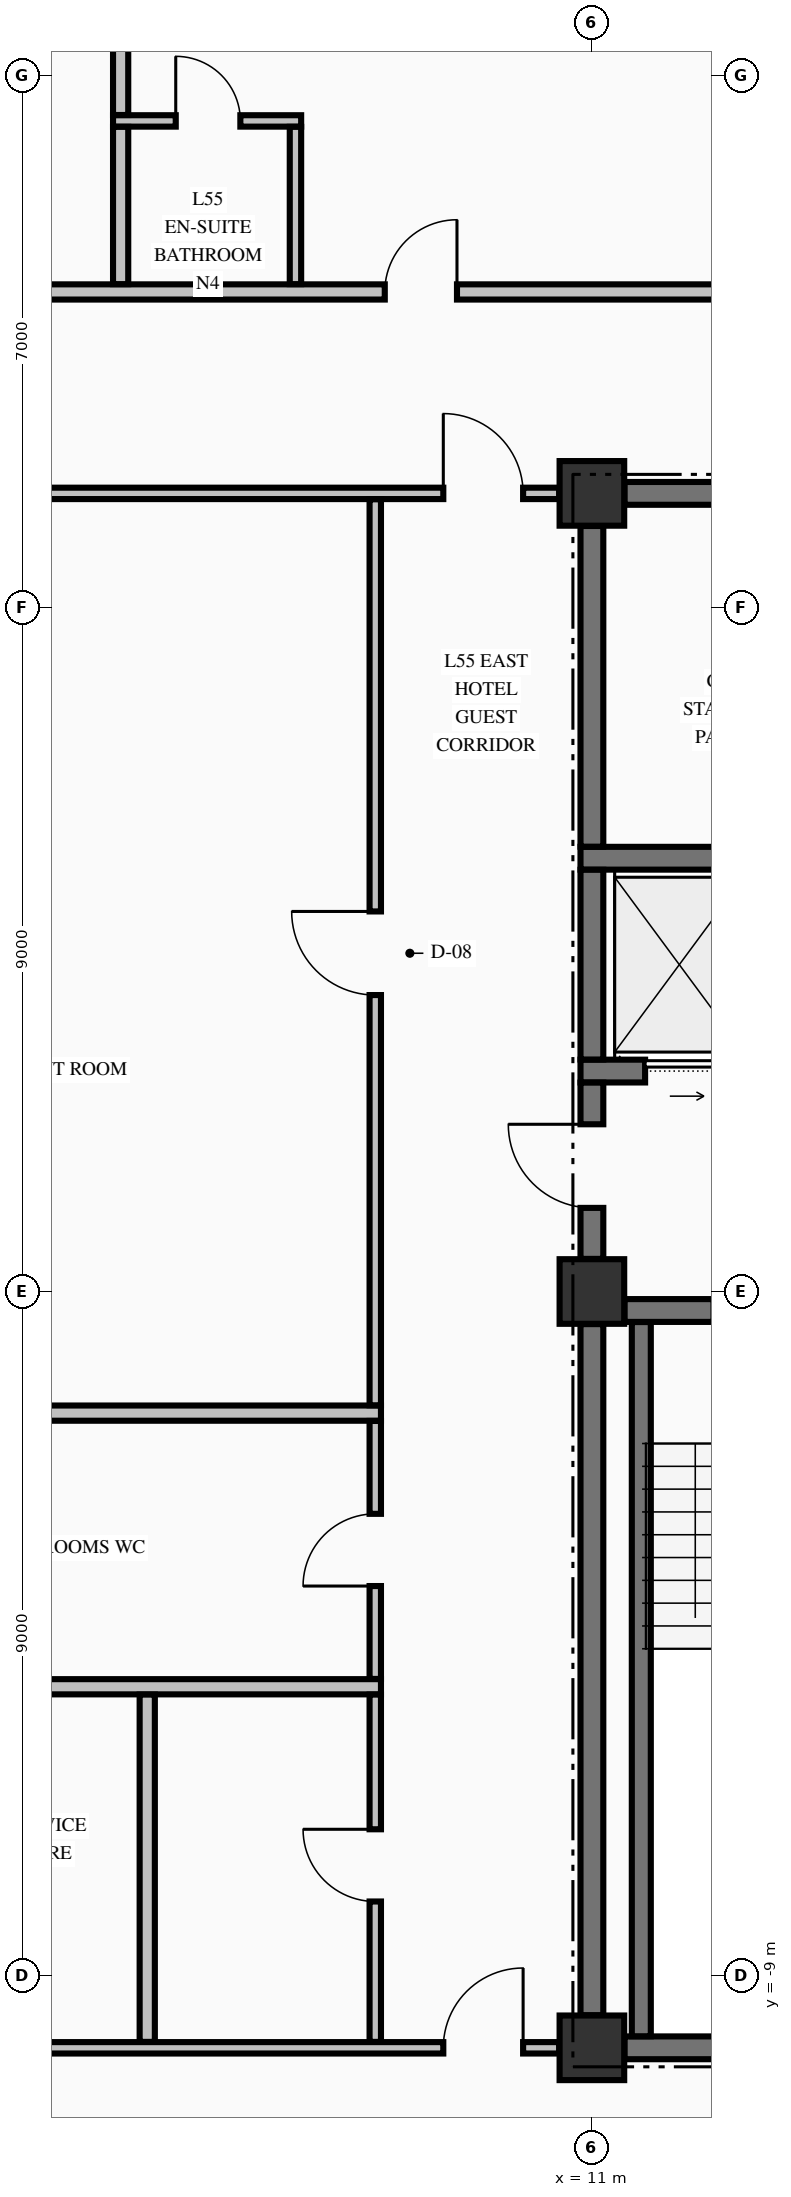
"""IFC4 building model, lengths in metres.
Left out: names, types, materials, properties, quantities, classifications, styles, units other than length and angle.
Written with IfcOpenShell. Run it as: python <this file> out.ifc"""

import sys

from ifc_helpers import new_model, si_unit, direction, frame, frame_2d, origin, origin_2d, place, context, subcontext, project, spatial, rectangle, extrude, element, fill, save


model = new_model("IFC4")
c1 = context("Model", 3, precision=1e-05, world=origin(), true_north=direction((0.0, 1.0)))
c2 = subcontext(c1, "Body", "Model", "MODEL_VIEW")
j1 = project(units=[si_unit("LENGTHUNIT", "METRE"), si_unit("PLANEANGLEUNIT", "RADIAN")], contexts=[c1])
p1 = place(None, origin())
s1 = spatial("IfcSite", under=j1, at=p1, CompositionType="ELEMENT")
p2 = place(p1, origin())
s2 = spatial("IfcBuilding", under=s1, at=p2, CompositionType="ELEMENT")
p3 = place(p2, frame((0.0, 0.0, 211.86)))
s3 = spatial("IfcBuildingStorey", under=s2, at=p3, CompositionType="ELEMENT", Elevation=211.86)
for number, where, z_axis, x_axis in (
    (1, (11.0, -9.95, -0.325), (0.0, 0.0, 1.0), (1.0, 0.0, 0.0)),
    (2, (11.0, 0.0, -0.325), (0.0, 0.0, 1.0), (1.0, 0.0, 0.0)),
    (3, (11.0, 10.5, -0.325), (0.0, 0.0, 1.0), (1.0, 0.0, 0.0)),
):
    element("IfcColumn", number, at=place(p3, frame(where, z_axis=z_axis, x_axis=x_axis)), inside=s3, PredefinedType="COLUMN", context=c2, shape_type="SweptSolid", body=[
        extrude(rectangle(XDim=0.85, YDim=0.85, at=origin_2d()), origin(), (0.0, 0.0, 1.0), 3.475),
    ])
p4 = place(p3, frame((11.429, -9.95, 0.0), z_axis=(0.0, 0.0, 1.0), x_axis=(1.0, 0.0, 0.0)))
e4 = element("IfcWall", 4, at=p4, inside=s3, PredefinedType="SHEAR", context=c2, shape_type="SweptSolid", body=[
    extrude(rectangle(XDim=3.271, YDim=0.3, at=frame_2d((1.635, 0.0))), origin(), (0.0, 0.0, 1.0), 3.15),
])
p5 = place(p3, frame((11.429, -0.25, 0.0), z_axis=(0.0, 0.0, 1.0), x_axis=(1.0, 0.0, 0.0)))
e5 = element("IfcWall", 5, at=p5, inside=s3, PredefinedType="SHEAR", context=c2, shape_type="SweptSolid", body=[
    extrude(rectangle(XDim=3.446, YDim=0.3, at=frame_2d((1.723, 0.0))), origin(), (0.0, 0.0, 1.0), 3.15),
])
p6 = place(p5, frame((1.171, 0.0, 0.0)))
e6 = element("IfcOpeningElement", 6, at=p6, cuts=e5, PredefinedType="OPENING", context=c2, shape_type="SweptSolid", body=[
    extrude(rectangle(XDim=1.1, YDim=2.15, at=frame_2d((0.55, 1.075))), frame((0.0, 0.16, 0.0), z_axis=(0.0, -1.0, 0.0), x_axis=(1.0, 0.0, 0.0)), (0.0, 0.0, 1.0), 0.32),
])
p7 = place(p3, frame((10.85, 2.9, 0.0), z_axis=(0.0, 0.0, 1.0), x_axis=(1.0, 0.0, 0.0)))
e7 = element("IfcWall", 7, at=p7, inside=s3, PredefinedType="SHEAR", context=c2, shape_type="SweptSolid", body=[
    extrude(rectangle(XDim=4.025, YDim=0.3, at=frame_2d((2.012, 0.0))), origin(), (0.0, 0.0, 1.0), 3.15),
])
p8 = place(p7, frame((0.85, 0.0, 0.0)))
e8 = element("IfcOpeningElement", 8, at=p8, cuts=e7, PredefinedType="OPENING", context=c2, shape_type="SweptSolid", body=[
    extrude(rectangle(XDim=1.1, YDim=2.2, at=frame_2d((0.55, 1.1))), frame((0.0, 0.16, 0.0), z_axis=(0.0, -1.0, 0.0), x_axis=(1.0, 0.0, 0.0)), (0.0, 0.0, 1.0), 0.32),
])
p9 = place(p3, frame((10.85, 5.7, 0.0), z_axis=(0.0, 0.0, 1.0), x_axis=(1.0, 0.0, 0.0)))
e9 = element("IfcWall", 9, at=p9, inside=s3, PredefinedType="SHEAR", context=c2, shape_type="SweptSolid", body=[
    extrude(rectangle(XDim=4.025, YDim=0.3, at=frame_2d((2.012, 0.0))), origin(), (0.0, 0.0, 1.0), 3.15),
])
p10 = place(p3, frame((11.429, 10.5, 0.0), z_axis=(0.0, 0.0, 1.0), x_axis=(1.0, 0.0, 0.0)))
e10 = element("IfcWall", 10, at=p10, inside=s3, PredefinedType="SHEAR", context=c2, shape_type="SweptSolid", body=[
    extrude(rectangle(XDim=3.271, YDim=0.3, at=frame_2d((1.635, 0.0))), origin(), (0.0, 0.0, 1.0), 3.15),
])
p11 = place(p10, frame((1.546, 0.0, 0.0)))
e11 = element("IfcOpeningElement", 11, at=p11, cuts=e10, PredefinedType="OPENING", context=c2, shape_type="SweptSolid", body=[
    extrude(rectangle(XDim=0.95, YDim=2.15, at=frame_2d((0.475, 1.075))), frame((0.0, 0.16, 0.0), z_axis=(0.0, -1.0, 0.0), x_axis=(1.0, 0.0, 0.0)), (0.0, 0.0, 1.0), 0.32),
])
p12 = place(p3, frame((-10.569, -9.95, 0.0), z_axis=(0.0, 0.0, 1.0), x_axis=(1.0, 0.0, 0.0)))
e12 = element("IfcWall", 12, at=p12, inside=s3, PredefinedType="PARTITIONING", context=c2, shape_type="SweptSolid", body=[
    extrude(rectangle(XDim=21.138, YDim=0.15, at=frame_2d((10.569, 0.0))), origin(), (0.0, 0.0, 1.0), 3.15),
])
p13 = place(p12, frame((0.474, 0.0, 0.0)))
e13 = element("IfcOpeningElement", 13, at=p13, cuts=e12, PredefinedType="OPENING", context=c2, shape_type="SweptSolid", body=[
    extrude(rectangle(XDim=1.05, YDim=2.15, at=frame_2d((0.525, 1.075))), frame((0.0, 0.085, 0.0), z_axis=(0.0, -1.0, 0.0), x_axis=(1.0, 0.0, 0.0)), (0.0, 0.0, 1.0), 0.17),
])
p14 = place(p12, frame((19.614, 0.0, 0.0)))
e14 = element("IfcOpeningElement", 14, at=p14, cuts=e12, PredefinedType="OPENING", context=c2, shape_type="SweptSolid", body=[
    extrude(rectangle(XDim=1.05, YDim=2.15, at=frame_2d((0.525, 1.075))), frame((0.0, 0.085, 0.0), z_axis=(0.0, -1.0, 0.0), x_axis=(1.0, 0.0, 0.0)), (0.0, 0.0, 1.0), 0.17),
])
p15 = place(p12, frame((11.774, 0.0, 0.0)))
e15 = element("IfcOpeningElement", 15, at=p15, cuts=e12, PredefinedType="OPENING", context=c2, shape_type="SweptSolid", body=[
    extrude(rectangle(XDim=0.95, YDim=2.15, at=frame_2d((0.475, 1.075))), frame((0.0, 0.085, 0.0), z_axis=(0.0, -1.0, 0.0), x_axis=(1.0, 0.0, 0.0)), (0.0, 0.0, 1.0), 0.17),
])
for number, where, z_axis, x_axis in (
    (16, (-1.9, -5.2, 0.0), (0.0, 0.0, 1.0), (1.0, 0.0, 0.0)),
    (17, (-1.9, -1.6, 0.0), (0.0, 0.0, 1.0), (1.0, 0.0, 0.0)),
):
    element("IfcWall", number, at=place(p3, frame(where, z_axis=z_axis, x_axis=x_axis)), inside=s3, PredefinedType="PARTITIONING", context=c2, shape_type="SweptSolid", body=[
        extrude(rectangle(XDim=10.125, YDim=0.2, at=frame_2d((5.062, 0.0))), origin(), (0.0, 0.0, 1.0), 3.15),
    ])
p16 = place(p3, frame((-10.569, 10.5, 0.0), z_axis=(0.0, 0.0, 1.0), x_axis=(1.0, 0.0, 0.0)))
e18 = element("IfcWall", 18, at=p16, inside=s3, PredefinedType="PARTITIONING", context=c2, shape_type="SweptSolid", body=[
    extrude(rectangle(XDim=21.138, YDim=0.15, at=frame_2d((10.569, 0.0))), origin(), (0.0, 0.0, 1.0), 3.15),
])
p17 = place(p16, frame((0.474, 0.0, 0.0)))
e19 = element("IfcOpeningElement", 19, at=p17, cuts=e18, PredefinedType="OPENING", context=c2, shape_type="SweptSolid", body=[
    extrude(rectangle(XDim=1.05, YDim=2.15, at=frame_2d((0.525, 1.075))), frame((0.0, 0.085, 0.0), z_axis=(0.0, -1.0, 0.0), x_axis=(1.0, 0.0, 0.0)), (0.0, 0.0, 1.0), 0.17),
])
p18 = place(p16, frame((19.614, 0.0, 0.0)))
e20 = element("IfcOpeningElement", 20, at=p18, cuts=e18, PredefinedType="OPENING", context=c2, shape_type="SweptSolid", body=[
    extrude(rectangle(XDim=1.05, YDim=2.15, at=frame_2d((0.525, 1.075))), frame((0.0, 0.085, 0.0), z_axis=(0.0, -1.0, 0.0), x_axis=(1.0, 0.0, 0.0)), (0.0, 0.0, 1.0), 0.17),
])
p19 = place(p3, frame((-22.1, 13.15, 0.0), z_axis=(0.0, 0.0, 1.0), x_axis=(1.0, 0.0, 0.0)))
e21 = element("IfcWall", 21, at=p19, inside=s3, PredefinedType="PARTITIONING", context=c2, shape_type="SweptSolid", body=[
    extrude(rectangle(XDim=39.2, YDim=0.2, at=frame_2d((19.6, 0.0))), origin(), (0.0, 0.0, 1.0), 3.15),
])
p20 = place(p19, frame((5.125, 0.0, 0.0)))
e22 = element("IfcOpeningElement", 22, at=p20, cuts=e21, PredefinedType="OPENING", context=c2, shape_type="SweptSolid", body=[
    extrude(rectangle(XDim=1.05, YDim=2.15, at=frame_2d((0.525, 1.075))), frame((0.0, 0.11, 0.0), z_axis=(0.0, -1.0, 0.0), x_axis=(1.0, 0.0, 0.0)), (0.0, 0.0, 1.0), 0.22),
])
p21 = place(p19, frame((14.125, 0.0, 0.0)))
e23 = element("IfcOpeningElement", 23, at=p21, cuts=e21, PredefinedType="OPENING", context=c2, shape_type="SweptSolid", body=[
    extrude(rectangle(XDim=0.95, YDim=2.15, at=frame_2d((0.475, 1.075))), frame((0.0, 0.11, 0.0), z_axis=(0.0, -1.0, 0.0), x_axis=(1.0, 0.0, 0.0)), (0.0, 0.0, 1.0), 0.22),
])
p22 = place(p19, frame((21.375, 0.0, 0.0)))
e24 = element("IfcOpeningElement", 24, at=p22, cuts=e21, PredefinedType="OPENING", context=c2, shape_type="SweptSolid", body=[
    extrude(rectangle(XDim=0.95, YDim=2.15, at=frame_2d((0.475, 1.075))), frame((0.0, 0.11, 0.0), z_axis=(0.0, -1.0, 0.0), x_axis=(1.0, 0.0, 0.0)), (0.0, 0.0, 1.0), 0.22),
])
p23 = place(p19, frame((30.375, 0.0, 0.0)))
e25 = element("IfcOpeningElement", 25, at=p23, cuts=e21, PredefinedType="OPENING", context=c2, shape_type="SweptSolid", body=[
    extrude(rectangle(XDim=0.95, YDim=2.15, at=frame_2d((0.475, 1.075))), frame((0.0, 0.11, 0.0), z_axis=(0.0, -1.0, 0.0), x_axis=(1.0, 0.0, 0.0)), (0.0, 0.0, 1.0), 0.22),
])
p24 = place(p3, frame((4.7, 15.4, 0.0), z_axis=(0.0, 0.0, 1.0), x_axis=(1.0, 0.0, 0.0)))
e26 = element("IfcWall", 26, at=p24, inside=s3, PredefinedType="PARTITIONING", context=c2, shape_type="SweptSolid", body=[
    extrude(rectangle(XDim=2.475, YDim=0.15, at=frame_2d((1.238, 0.0))), origin(), (0.0, 0.0, 1.0), 3.15),
])
p25 = place(p24, frame((0.825, 0.0, 0.0)))
e27 = element("IfcOpeningElement", 27, at=p25, cuts=e26, PredefinedType="OPENING", context=c2, shape_type="SweptSolid", body=[
    extrude(rectangle(XDim=0.85, YDim=2.1, at=frame_2d((0.425, 1.05))), frame((0.0, 0.085, 0.0), z_axis=(0.0, -1.0, 0.0), x_axis=(1.0, 0.0, 0.0)), (0.0, 0.0, 1.0), 0.17),
])
p26 = place(p3, frame((11.0, -9.521, 0.0), z_axis=(0.0, 0.0, 1.0), x_axis=(0.0, 1.0, 0.0)))
e28 = element("IfcWall", 28, at=p26, inside=s3, PredefinedType="SHEAR", context=c2, shape_type="SweptSolid", body=[
    extrude(rectangle(XDim=9.092, YDim=0.3, at=frame_2d((4.546, 0.0))), origin(), (0.0, 0.0, 1.0), 3.15),
])
p27 = place(p3, frame((11.0, 0.429, 0.0), z_axis=(0.0, 0.0, 1.0), x_axis=(0.0, 1.0, 0.0)))
e29 = element("IfcWall", 29, at=p27, inside=s3, PredefinedType="SHEAR", context=c2, shape_type="SweptSolid", body=[
    extrude(rectangle(XDim=2.319, YDim=0.3, at=frame_2d((1.16, 0.0))), origin(), (0.0, 0.0, 1.0), 3.15),
])
p28 = place(p27, frame((0.671, 0.0, 0.0)))
e30 = element("IfcOpeningElement", 30, at=p28, cuts=e29, PredefinedType="OPENING", context=c2, shape_type="SweptSolid", body=[
    extrude(rectangle(XDim=1.1, YDim=2.15, at=frame_2d((0.55, 1.075))), frame((0.0, 0.16, 0.0), z_axis=(0.0, -1.0, 0.0), x_axis=(1.0, 0.0, 0.0)), (0.0, 0.0, 1.0), 0.32),
])
p29 = place(p3, frame((11.0, 3.052, 0.0), z_axis=(0.0, 0.0, 1.0), x_axis=(0.0, 1.0, 0.0)))
e31 = element("IfcWall", 31, at=p29, inside=s3, PredefinedType="SHEAR", context=c2, shape_type="SweptSolid", body=[
    extrude(rectangle(XDim=2.496, YDim=0.3, at=frame_2d((1.248, 0.0))), origin(), (0.0, 0.0, 1.0), 3.15),
])
p30 = place(p3, frame((11.0, 5.852, 0.0), z_axis=(0.0, 0.0, 1.0), x_axis=(0.0, 1.0, 0.0)))
e32 = element("IfcWall", 32, at=p30, inside=s3, PredefinedType="SHEAR", context=c2, shape_type="SweptSolid", body=[
    extrude(rectangle(XDim=4.219, YDim=0.3, at=frame_2d((2.109, 0.0))), origin(), (0.0, 0.0, 1.0), 3.15),
])
p31 = place(p3, frame((11.65, -9.798, 0.0), z_axis=(0.0, 0.0, 1.0), x_axis=(0.0, 1.0, 0.0)))
e33 = element("IfcWall", 33, at=p31, inside=s3, PredefinedType="SOLIDWALL", context=c2, shape_type="SweptSolid", body=[
    extrude(rectangle(XDim=9.396, YDim=0.25, at=frame_2d((4.698, 0.0))), origin(), (0.0, 0.0, 1.0), 3.15),
])
p32 = place(p3, frame((4.8, 13.253, 0.0), z_axis=(0.0, 0.0, 1.0), x_axis=(0.0, 1.0, 0.0)))
e34 = element("IfcWall", 34, at=p32, inside=s3, PredefinedType="PARTITIONING", context=c2, shape_type="SweptSolid", body=[
    extrude(rectangle(XDim=2.069, YDim=0.2, at=frame_2d((1.035, 0.0))), origin(), (0.0, 0.0, 1.0), 3.15),
])
p33 = place(p3, frame((4.8, 15.478, 0.0), z_axis=(0.0, 0.0, 1.0), x_axis=(0.0, 1.0, 0.0)))
e35 = element("IfcWall", 35, at=p33, inside=s3, PredefinedType="PARTITIONING", context=c2, shape_type="SweptSolid", body=[
    extrude(rectangle(XDim=8.857, YDim=0.2, at=frame_2d((4.428, 0.0))), origin(), (0.0, 0.0, 1.0), 3.15),
])
p34 = place(p3, frame((5.15, -9.872, 0.0), z_axis=(0.0, 0.0, 1.0), x_axis=(0.0, 1.0, 0.0)))
e36 = element("IfcWall", 36, at=p34, inside=s3, PredefinedType="PARTITIONING", context=c2, shape_type="SweptSolid", body=[
    extrude(rectangle(XDim=4.569, YDim=0.2, at=frame_2d((2.285, 0.0))), origin(), (0.0, 0.0, 1.0), 3.15),
])
p35 = place(p3, frame((7.1, 13.253, 0.0), z_axis=(0.0, 0.0, 1.0), x_axis=(0.0, 1.0, 0.0)))
e37 = element("IfcWall", 37, at=p35, inside=s3, PredefinedType="PARTITIONING", context=c2, shape_type="SweptSolid", body=[
    extrude(rectangle(XDim=2.069, YDim=0.15, at=frame_2d((1.035, 0.0))), origin(), (0.0, 0.0, 1.0), 3.15),
])
p36 = place(p3, frame((8.15, -9.872, 0.0), z_axis=(0.0, 0.0, 1.0), x_axis=(0.0, 1.0, 0.0)))
e38 = element("IfcWall", 38, at=p36, inside=s3, PredefinedType="PARTITIONING", context=c2, shape_type="SweptSolid", body=[
    extrude(rectangle(XDim=4.569, YDim=0.15, at=frame_2d((2.285, 0.0))), origin(), (0.0, 0.0, 1.0), 3.15),
])
p37 = place(p36, frame((1.847, 0.0, 0.0)))
e39 = element("IfcOpeningElement", 39, at=p37, cuts=e38, PredefinedType="OPENING", context=c2, shape_type="SweptSolid", body=[
    extrude(rectangle(XDim=0.95, YDim=2.15, at=frame_2d((0.475, 1.075))), frame((0.0, 0.085, 0.0), z_axis=(0.0, -1.0, 0.0), x_axis=(1.0, 0.0, 0.0)), (0.0, 0.0, 1.0), 0.17),
])
p38 = place(p3, frame((8.15, -5.097, 0.0), z_axis=(0.0, 0.0, 1.0), x_axis=(0.0, 1.0, 0.0)))
e40 = element("IfcWall", 40, at=p38, inside=s3, PredefinedType="PARTITIONING", context=c2, shape_type="SweptSolid", body=[
    extrude(rectangle(XDim=3.394, YDim=0.15, at=frame_2d((1.697, 0.0))), origin(), (0.0, 0.0, 1.0), 3.15),
])
p39 = place(p38, frame((1.222, 0.0, 0.0)))
e41 = element("IfcOpeningElement", 41, at=p39, cuts=e40, PredefinedType="OPENING", context=c2, shape_type="SweptSolid", body=[
    extrude(rectangle(XDim=0.95, YDim=2.15, at=frame_2d((0.475, 1.075))), frame((0.0, 0.085, 0.0), z_axis=(0.0, -1.0, 0.0), x_axis=(1.0, 0.0, 0.0)), (0.0, 0.0, 1.0), 0.17),
])
p40 = place(p3, frame((8.15, -1.497, 0.0), z_axis=(0.0, 0.0, 1.0), x_axis=(0.0, 1.0, 0.0)))
e42 = element("IfcWall", 42, at=p40, inside=s3, PredefinedType="PARTITIONING", context=c2, shape_type="SweptSolid", body=[
    extrude(rectangle(XDim=11.919, YDim=0.15, at=frame_2d((5.959, 0.0))), origin(), (0.0, 0.0, 1.0), 3.15),
])
p41 = place(p40, frame((5.397, 0.0, 0.0)))
e43 = element("IfcOpeningElement", 43, at=p41, cuts=e42, PredefinedType="OPENING", context=c2, shape_type="SweptSolid", body=[
    extrude(rectangle(XDim=1.1, YDim=2.15, at=frame_2d((0.55, 1.075))), frame((0.0, 0.085, 0.0), z_axis=(0.0, -1.0, 0.0), x_axis=(1.0, 0.0, 0.0)), (0.0, 0.0, 1.0), 0.17),
])
p42 = place(p28, origin())
e44 = element("IfcDoor", 44, at=p42, inside=s3, OperationType="SINGLE_SWING_RIGHT", PredefinedType="DOOR", context=c2, shape_type="SweptSolid", body=[
    extrude(rectangle(XDim=1.1, YDim=2.15, at=frame_2d((0.55, 1.075))), frame((0.0, 0.025, 0.0), z_axis=(0.0, -1.0, 0.0), x_axis=(1.0, 0.0, 0.0)), (0.0, 0.0, 1.0), 0.05),
])
fill(e30, e44)
p43 = place(p8, origin())
e45 = element("IfcDoor", 45, at=p43, inside=s3, OperationType="SLIDING_TO_RIGHT", PredefinedType="DOOR", context=c2, shape_type="SweptSolid", body=[
    extrude(rectangle(XDim=1.1, YDim=2.2, at=frame_2d((0.55, 1.1))), frame((0.0, 0.025, 0.0), z_axis=(0.0, -1.0, 0.0), x_axis=(1.0, 0.0, 0.0)), (0.0, 0.0, 1.0), 0.05),
])
fill(e8, e45)
p44 = place(p18, origin())
e46 = element("IfcDoor", 46, at=p44, inside=s3, OperationType="SINGLE_SWING_LEFT", PredefinedType="DOOR", context=c2, shape_type="SweptSolid", body=[
    extrude(rectangle(XDim=1.05, YDim=2.15, at=frame_2d((0.525, 1.075))), frame((0.0, 0.025, 0.0), z_axis=(0.0, -1.0, 0.0), x_axis=(1.0, 0.0, 0.0)), (0.0, 0.0, 1.0), 0.05),
])
fill(e20, e46)
p45 = place(p14, origin())
e47 = element("IfcDoor", 47, at=p45, inside=s3, OperationType="SINGLE_SWING_RIGHT", PredefinedType="DOOR", context=c2, shape_type="SweptSolid", body=[
    extrude(rectangle(XDim=1.05, YDim=2.15, at=frame_2d((0.525, 1.075))), frame((0.0, 0.025, 0.0), z_axis=(0.0, -1.0, 0.0), x_axis=(1.0, 0.0, 0.0)), (0.0, 0.0, 1.0), 0.05),
])
fill(e14, e47)
p46 = place(p23, origin())
e48 = element("IfcDoor", 48, at=p46, inside=s3, OperationType="SINGLE_SWING_RIGHT", PredefinedType="DOOR", context=c2, shape_type="SweptSolid", body=[
    extrude(rectangle(XDim=0.95, YDim=2.15, at=frame_2d((0.475, 1.075))), frame((0.0, 0.025, 0.0), z_axis=(0.0, -1.0, 0.0), x_axis=(1.0, 0.0, 0.0)), (0.0, 0.0, 1.0), 0.05),
])
fill(e25, e48)
p47 = place(p25, origin())
e49 = element("IfcDoor", 49, at=p47, inside=s3, OperationType="SINGLE_SWING_LEFT", PredefinedType="DOOR", context=c2, shape_type="SweptSolid", body=[
    extrude(rectangle(XDim=0.85, YDim=2.1, at=frame_2d((0.425, 1.05))), frame((0.0, 0.025, 0.0), z_axis=(0.0, -1.0, 0.0), x_axis=(1.0, 0.0, 0.0)), (0.0, 0.0, 1.0), 0.05),
])
fill(e27, e49)
p48 = place(p41, origin())
e50 = element("IfcDoor", 50, at=p48, inside=s3, OperationType="SINGLE_SWING_RIGHT", PredefinedType="DOOR", context=c2, shape_type="SweptSolid", body=[
    extrude(rectangle(XDim=1.1, YDim=2.15, at=frame_2d((0.55, 1.075))), frame((0.0, 0.025, 0.0), z_axis=(0.0, -1.0, 0.0), x_axis=(1.0, 0.0, 0.0)), (0.0, 0.0, 1.0), 0.05),
])
fill(e43, e50)
p49 = place(p39, origin())
e51 = element("IfcDoor", 51, at=p49, inside=s3, OperationType="SINGLE_SWING_LEFT", PredefinedType="DOOR", context=c2, shape_type="SweptSolid", body=[
    extrude(rectangle(XDim=0.95, YDim=2.15, at=frame_2d((0.475, 1.075))), frame((0.0, 0.025, 0.0), z_axis=(0.0, -1.0, 0.0), x_axis=(1.0, 0.0, 0.0)), (0.0, 0.0, 1.0), 0.05),
])
fill(e41, e51)
p50 = place(p37, origin())
e52 = element("IfcDoor", 52, at=p50, inside=s3, OperationType="SINGLE_SWING_RIGHT", PredefinedType="DOOR", context=c2, shape_type="SweptSolid", body=[
    extrude(rectangle(XDim=0.95, YDim=2.15, at=frame_2d((0.475, 1.075))), frame((0.0, 0.025, 0.0), z_axis=(0.0, -1.0, 0.0), x_axis=(1.0, 0.0, 0.0)), (0.0, 0.0, 1.0), 0.05),
])
fill(e39, e52)
save(model, sys.argv[1])
